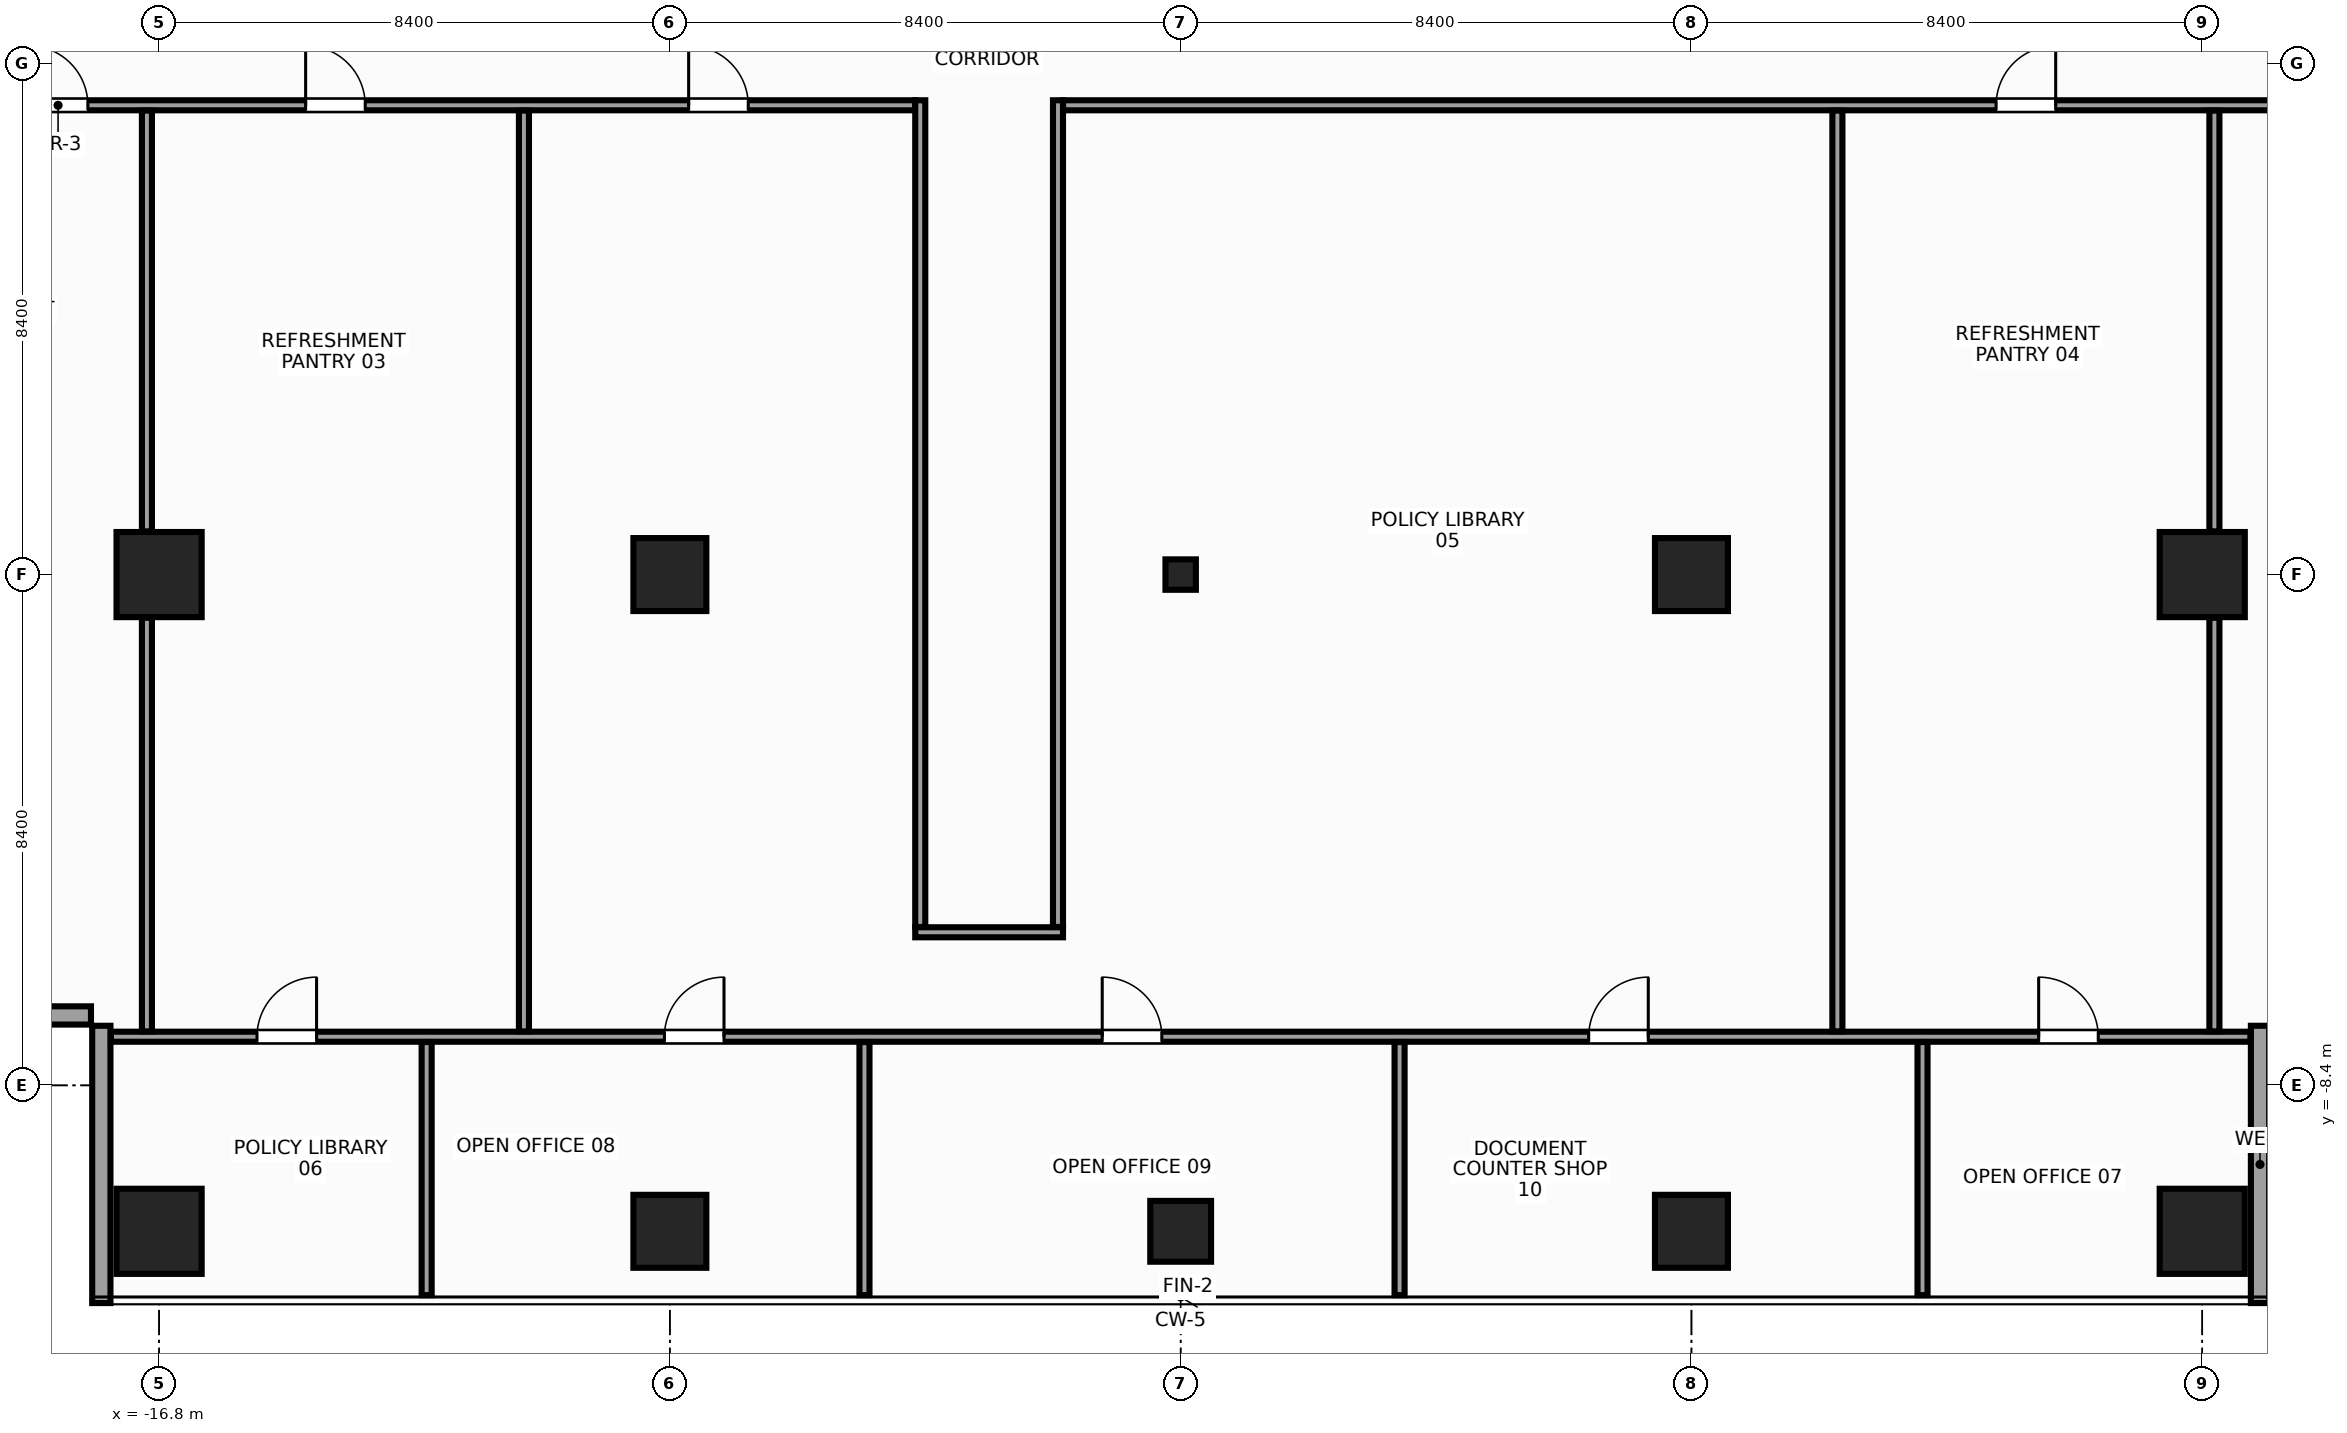
"""IFC4 building model, lengths in metres.
Left out: names, types, materials, properties, quantities, classifications, styles, units other than length and angle.
Written with IfcOpenShell. Run it as: python <this file> out.ifc"""

import sys

from ifc_helpers import new_model, si_unit, direction, frame, frame_2d, origin, origin_with_axes, origin_2d, place, context, subcontext, project, spatial, rectangle, hollow_rectangle, extrude, source, transform, mapped, element, fill, save


model = new_model("IFC4")
c1 = context("Model", 3, precision=1e-05, world=origin(), true_north=direction((0.0, 1.0)))
c2 = subcontext(c1, "Body", "Model", "MODEL_VIEW")
j1 = project(units=[si_unit("LENGTHUNIT", "METRE"), si_unit("PLANEANGLEUNIT", "RADIAN")], contexts=[c1])
p1 = place(None, origin())
s1 = spatial("IfcSite", under=j1, at=p1, CompositionType="ELEMENT")
p2 = place(p1, origin())
s2 = spatial("IfcBuilding", under=s1, at=p2, CompositionType="ELEMENT")
p3 = place(p2, frame((0.0, 0.0, 254.0)))
s3 = spatial("IfcBuildingStorey", under=s2, at=p3, CompositionType="ELEMENT", Elevation=254.0)
m1 = source(origin(), c2, "Body", "SweptSolid", [
    extrude(rectangle(XDim=1.4, YDim=1.4, at=origin_2d()), origin(), (0.0, 0.0, 1.0), 3.6),
])
for number, where, z_axis, x_axis in (
    (1, (-16.8, -10.8, 0.0), (0.0, 0.0, 1.0), (1.0, 0.0, 0.0)),
    (2, (-16.8, 0.0, 0.0), (0.0, 0.0, 1.0), (1.0, 0.0, 0.0)),
    (3, (16.8, -10.8, 0.0), (0.0, 0.0, 1.0), (1.0, 0.0, 0.0)),
    (4, (16.8, 0.0, 0.0), (0.0, 0.0, 1.0), (1.0, 0.0, 0.0)),
):
    element("IfcColumn", number, at=place(p3, frame(where, z_axis=z_axis, x_axis=x_axis)), inside=s3, PredefinedType="COLUMN", context=c2, shape_type="MappedRepresentation", body=[
        mapped(m1, transform((0.0, 0.0, 0.0), x_axis=(1.0, 0.0, 0.0), y_axis=(0.0, 1.0, 0.0), z_axis=(0.0, 0.0, 1.0), scale=1.0)),
    ])
m2 = source(origin(), c2, "Body", "SweptSolid", [
    extrude(rectangle(XDim=1.2, YDim=1.2, at=origin_2d()), origin(), (0.0, 0.0, 1.0), 3.6),
])
for number, where, z_axis, x_axis in (
    (5, (-8.4, 0.0, 0.0), (0.0, 0.0, 1.0), (1.0, 0.0, 0.0)),
    (6, (-8.4, -10.8, 0.0), (0.0, 0.0, 1.0), (1.0, 0.0, 0.0)),
    (7, (8.4, 0.0, 0.0), (0.0, 0.0, 1.0), (1.0, 0.0, 0.0)),
    (8, (8.4, -10.8, 0.0), (0.0, 0.0, 1.0), (1.0, 0.0, 0.0)),
):
    element("IfcColumn", number, at=place(p3, frame(where, z_axis=z_axis, x_axis=x_axis)), inside=s3, PredefinedType="COLUMN", context=c2, shape_type="MappedRepresentation", body=[
        mapped(m2, transform((0.0, 0.0, 0.0), x_axis=(1.0, 0.0, 0.0), y_axis=(0.0, 1.0, 0.0), z_axis=(0.0, 0.0, 1.0), scale=1.0)),
    ])
m3 = source(origin(), c2, "Body", "SweptSolid", [
    extrude(rectangle(XDim=1.0, YDim=1.0, at=origin_2d()), origin(), (0.0, 0.0, 1.0), 3.6),
])
p4 = place(p3, frame((0.0, -10.8, 0.0), z_axis=(0.0, 0.0, 1.0), x_axis=(1.0, 0.0, 0.0)))
e9 = element("IfcColumn", 9, at=p4, inside=s3, PredefinedType="COLUMN", context=c2, shape_type="MappedRepresentation", body=[
    mapped(m3, transform((0.0, 0.0, 0.0), x_axis=(1.0, 0.0, 0.0), y_axis=(0.0, 1.0, 0.0), z_axis=(0.0, 0.0, 1.0), scale=1.0)),
])
m4 = source(origin(), c2, "Body", "SweptSolid", [
    extrude(hollow_rectangle(XDim=0.5, YDim=0.5, WallThickness=0.025, at=origin_2d()), origin(), (0.0, 0.0, 1.0), 3.6),
])
p5 = place(p3, origin_with_axes())
e10 = element("IfcColumn", 10, at=p5, inside=s3, PredefinedType="COLUMN", context=c2, shape_type="MappedRepresentation", body=[
    mapped(m4, transform((0.0, 0.0, 0.0), x_axis=(1.0, 0.0, 0.0), y_axis=(0.0, 1.0, 0.0), z_axis=(0.0, 0.0, 1.0), scale=1.0)),
])
m5 = source(origin(), c2, "Body", "SweptSolid", [
    extrude(rectangle(XDim=4.56, YDim=0.3, at=frame_2d((2.28, 0.0))), origin(), (0.0, 0.0, 1.0), 2.75),
])
for number, where, z_axis, x_axis in (
    (11, (17.75, -11.98, 0.0), (0.0, 0.0, 1.0), (0.0, 1.0, 0.0)),
    (12, (-22.48, -7.25, 0.0), (0.0, 0.0, 1.0), (1.0, 0.0, 0.0)),
    (13, (-17.75, -7.42, 0.0), (0.0, 0.0, 1.0), (0.0, -1.0, 0.0)),
):
    element("IfcWall", number, at=place(p3, frame(where, z_axis=z_axis, x_axis=x_axis)), inside=s3, PredefinedType="STANDARD", context=c2, shape_type="MappedRepresentation", body=[
        mapped(m5, transform((0.0, 0.0, 0.0), x_axis=(1.0, 0.0, 0.0), y_axis=(0.0, 1.0, 0.0), z_axis=(0.0, 0.0, 1.0), scale=1.0)),
    ])
m6 = source(origin(), c2, "Body", "SweptSolid", [
    extrude(rectangle(XDim=15.6, YDim=0.165, at=frame_2d((7.8, 0.0))), origin(), (0.0, 0.0, 1.0), 2.755),
])
p6 = place(p3, frame((-19.965, 7.718, 0.0), z_axis=(0.0, 0.0, 1.0), x_axis=(1.0, 0.0, 0.0)))
e14 = element("IfcWall", 14, at=p6, inside=s3, PredefinedType="PARTITIONING", context=c2, shape_type="MappedRepresentation", body=[
    mapped(m6, transform((0.0, 0.0, 0.0), x_axis=(1.0, 0.0, 0.0), y_axis=(0.0, 1.0, 0.0), z_axis=(0.0, 0.0, 1.0), scale=1.0)),
])
p7 = place(p6, frame((1.014, 0.0, 0.0)))
e15 = element("IfcOpeningElement", 15, at=p7, cuts=e14, PredefinedType="OPENING", context=c2, shape_type="SweptSolid", body=[
    extrude(rectangle(XDim=0.98, YDim=2.15, at=frame_2d((0.49, 1.075))), frame((0.0, 0.094, 0.0), z_axis=(0.0, -1.0, 0.0), x_axis=(1.0, 0.0, 0.0)), (0.0, 0.0, 1.0), 0.189),
])
p8 = place(p6, frame((5.575, 0.0, 0.0)))
e16 = element("IfcOpeningElement", 16, at=p8, cuts=e14, PredefinedType="OPENING", context=c2, shape_type="SweptSolid", body=[
    extrude(rectangle(XDim=0.98, YDim=2.15, at=frame_2d((0.49, 1.075))), frame((0.0, 0.094, 0.0), z_axis=(0.0, -1.0, 0.0), x_axis=(1.0, 0.0, 0.0)), (0.0, 0.0, 1.0), 0.189),
])
p9 = place(p6, frame((11.874, 0.0, 0.0)))
e17 = element("IfcOpeningElement", 17, at=p9, cuts=e14, PredefinedType="OPENING", context=c2, shape_type="SweptSolid", body=[
    extrude(rectangle(XDim=0.98, YDim=2.15, at=frame_2d((0.49, 1.075))), frame((0.0, 0.094, 0.0), z_axis=(0.0, -1.0, 0.0), x_axis=(1.0, 0.0, 0.0)), (0.0, 0.0, 1.0), 0.189),
])
m7 = source(origin(), c2, "Body", "SweptSolid", [
    extrude(rectangle(XDim=21.9, YDim=0.165, at=frame_2d((10.95, 0.0))), origin(), (0.0, 0.0, 1.0), 2.755),
])
p10 = place(p3, frame((-1.935, 7.718, 0.0), z_axis=(0.0, 0.0, 1.0), x_axis=(1.0, 0.0, 0.0)))
e18 = element("IfcWall", 18, at=p10, inside=s3, PredefinedType="PARTITIONING", context=c2, shape_type="MappedRepresentation", body=[
    mapped(m7, transform((0.0, 0.0, 0.0), x_axis=(1.0, 0.0, 0.0), y_axis=(0.0, 1.0, 0.0), z_axis=(0.0, 0.0, 1.0), scale=1.0)),
])
p11 = place(p10, frame((19.906, 0.0, 0.0)))
e19 = element("IfcOpeningElement", 19, at=p11, cuts=e18, PredefinedType="OPENING", context=c2, shape_type="SweptSolid", body=[
    extrude(rectangle(XDim=0.98, YDim=2.15, at=frame_2d((0.49, 1.075))), frame((0.0, 0.094, 0.0), z_axis=(0.0, -1.0, 0.0), x_axis=(1.0, 0.0, 0.0)), (0.0, 0.0, 1.0), 0.189),
])
p12 = place(p10, frame((15.345, 0.0, 0.0)))
e20 = element("IfcOpeningElement", 20, at=p12, cuts=e18, PredefinedType="OPENING", context=c2, shape_type="SweptSolid", body=[
    extrude(rectangle(XDim=0.98, YDim=2.15, at=frame_2d((0.49, 1.075))), frame((0.0, 0.094, 0.0), z_axis=(0.0, -1.0, 0.0), x_axis=(1.0, 0.0, 0.0)), (0.0, 0.0, 1.0), 0.189),
])
m8 = source(origin(), c2, "Body", "SweptSolid", [
    extrude(rectangle(XDim=2.43, YDim=0.165, at=frame_2d((1.215, 0.0))), origin(), (0.0, 0.0, 1.0), 3.37),
])
p13 = place(p3, frame((-4.365, -5.883, 0.0), z_axis=(0.0, 0.0, 1.0), x_axis=(1.0, 0.0, 0.0)))
e21 = element("IfcWall", 21, at=p13, inside=s3, PredefinedType="PARTITIONING", context=c2, shape_type="MappedRepresentation", body=[
    mapped(m8, transform((0.0, 0.0, 0.0), x_axis=(1.0, 0.0, 0.0), y_axis=(0.0, 1.0, 0.0), z_axis=(0.0, 0.0, 1.0), scale=1.0)),
])
m9 = source(origin(), c2, "Body", "SweptSolid", [
    extrude(rectangle(XDim=13.595, YDim=0.165, at=frame_2d((6.797, 0.0))), origin(), (0.0, 0.0, 1.0), 2.655),
])
for number, where, z_axis, x_axis in (
    (22, (-4.282, -5.795, 0.0), (0.0, 0.0, 1.0), (0.0, 1.0, 0.0)),
    (23, (-2.018, -5.795, 0.0), (0.0, 0.0, 1.0), (0.0, 1.0, 0.0)),
):
    element("IfcWall", number, at=place(p3, frame(where, z_axis=z_axis, x_axis=x_axis)), inside=s3, PredefinedType="PARTITIONING", context=c2, shape_type="MappedRepresentation", body=[
        mapped(m9, transform((0.0, 0.0, 0.0), x_axis=(1.0, 0.0, 0.0), y_axis=(0.0, 1.0, 0.0), z_axis=(0.0, 0.0, 1.0), scale=1.0)),
    ])
m10 = source(origin(), c2, "Body", "SweptSolid", [
    extrude(rectangle(XDim=35.184, YDim=0.165, at=frame_2d((17.592, 0.0))), origin(), (0.0, 0.0, 1.0), 2.755),
])
p14 = place(p3, frame((-17.592, -7.6, 0.0), z_axis=(0.0, 0.0, 1.0), x_axis=(1.0, 0.0, 0.0)))
e24 = element("IfcWall", 24, at=p14, inside=s3, PredefinedType="PARTITIONING", context=c2, shape_type="MappedRepresentation", body=[
    mapped(m10, transform((0.0, 0.0, 0.0), x_axis=(1.0, 0.0, 0.0), y_axis=(0.0, 1.0, 0.0), z_axis=(0.0, 0.0, 1.0), scale=1.0)),
])
p15 = place(p14, frame((2.402, 0.0, 0.0)))
e25 = element("IfcOpeningElement", 25, at=p15, cuts=e24, PredefinedType="OPENING", context=c2, shape_type="SweptSolid", body=[
    extrude(rectangle(XDim=0.98, YDim=2.15, at=frame_2d((0.49, 1.075))), frame((0.0, 0.094, 0.0), z_axis=(0.0, -1.0, 0.0), x_axis=(1.0, 0.0, 0.0)), (0.0, 0.0, 1.0), 0.189),
])
p16 = place(p14, frame((31.702, 0.0, 0.0)))
e26 = element("IfcOpeningElement", 26, at=p16, cuts=e24, PredefinedType="OPENING", context=c2, shape_type="SweptSolid", body=[
    extrude(rectangle(XDim=0.98, YDim=2.15, at=frame_2d((0.49, 1.075))), frame((0.0, 0.094, 0.0), z_axis=(0.0, -1.0, 0.0), x_axis=(1.0, 0.0, 0.0)), (0.0, 0.0, 1.0), 0.189),
])
p17 = place(p14, frame((9.102, 0.0, 0.0)))
e27 = element("IfcOpeningElement", 27, at=p17, cuts=e24, PredefinedType="OPENING", context=c2, shape_type="SweptSolid", body=[
    extrude(rectangle(XDim=0.98, YDim=2.15, at=frame_2d((0.49, 1.075))), frame((0.0, 0.094, 0.0), z_axis=(0.0, -1.0, 0.0), x_axis=(1.0, 0.0, 0.0)), (0.0, 0.0, 1.0), 0.189),
])
p18 = place(p14, frame((16.302, 0.0, 0.0)))
e28 = element("IfcOpeningElement", 28, at=p18, cuts=e24, PredefinedType="OPENING", context=c2, shape_type="SweptSolid", body=[
    extrude(rectangle(XDim=0.98, YDim=2.15, at=frame_2d((0.49, 1.075))), frame((0.0, 0.094, 0.0), z_axis=(0.0, -1.0, 0.0), x_axis=(1.0, 0.0, 0.0)), (0.0, 0.0, 1.0), 0.189),
])
p19 = place(p14, frame((24.302, 0.0, 0.0)))
e29 = element("IfcOpeningElement", 29, at=p19, cuts=e24, PredefinedType="OPENING", context=c2, shape_type="SweptSolid", body=[
    extrude(rectangle(XDim=0.98, YDim=2.15, at=frame_2d((0.49, 1.075))), frame((0.0, 0.094, 0.0), z_axis=(0.0, -1.0, 0.0), x_axis=(1.0, 0.0, 0.0)), (0.0, 0.0, 1.0), 0.189),
])
m11 = source(origin(), c2, "Body", "SweptSolid", [
    extrude(rectangle(XDim=6.802, YDim=0.165, at=frame_2d((3.401, 0.0))), origin(), (0.0, 0.0, 1.0), 2.755),
])
p20 = place(p3, frame((-17.0, -7.512, 0.0), z_axis=(0.0, 0.0, 1.0), x_axis=(0.0, 1.0, 0.0)))
e30 = element("IfcWall", 30, at=p20, inside=s3, PredefinedType="PARTITIONING", context=c2, shape_type="MappedRepresentation", body=[
    mapped(m11, transform((0.0, 0.0, 0.0), x_axis=(1.0, 0.0, 0.0), y_axis=(0.0, 1.0, 0.0), z_axis=(0.0, 0.0, 1.0), scale=1.0)),
])
m12 = source(origin(), c2, "Body", "SweptSolid", [
    extrude(rectangle(XDim=6.92, YDim=0.165, at=frame_2d((3.46, 0.0))), origin(), (0.0, 0.0, 1.0), 2.755),
])
p21 = place(p3, frame((-17.0, 0.71, 0.0), z_axis=(0.0, 0.0, 1.0), x_axis=(0.0, 1.0, 0.0)))
e31 = element("IfcWall", 31, at=p21, inside=s3, PredefinedType="PARTITIONING", context=c2, shape_type="MappedRepresentation", body=[
    mapped(m12, transform((0.0, 0.0, 0.0), x_axis=(1.0, 0.0, 0.0), y_axis=(0.0, 1.0, 0.0), z_axis=(0.0, 0.0, 1.0), scale=1.0)),
])
m13 = source(origin(), c2, "Body", "SweptSolid", [
    extrude(rectangle(XDim=15.142, YDim=0.165, at=frame_2d((7.571, 0.0))), origin(), (0.0, 0.0, 1.0), 2.655),
])
for number, where, z_axis, x_axis in (
    (32, (-10.8, -7.512, 0.0), (0.0, 0.0, 1.0), (0.0, 1.0, 0.0)),
    (33, (10.8, -7.512, 0.0), (0.0, 0.0, 1.0), (0.0, 1.0, 0.0)),
):
    element("IfcWall", number, at=place(p3, frame(where, z_axis=z_axis, x_axis=x_axis)), inside=s3, PredefinedType="PARTITIONING", context=c2, shape_type="MappedRepresentation", body=[
        mapped(m13, transform((0.0, 0.0, 0.0), x_axis=(1.0, 0.0, 0.0), y_axis=(0.0, 1.0, 0.0), z_axis=(0.0, 0.0, 1.0), scale=1.0)),
    ])
p22 = place(p3, frame((17.0, -7.512, 0.0), z_axis=(0.0, 0.0, 1.0), x_axis=(0.0, 1.0, 0.0)))
e34 = element("IfcWall", 34, at=p22, inside=s3, PredefinedType="PARTITIONING", context=c2, shape_type="MappedRepresentation", body=[
    mapped(m11, transform((0.0, 0.0, 0.0), x_axis=(1.0, 0.0, 0.0), y_axis=(0.0, 1.0, 0.0), z_axis=(0.0, 0.0, 1.0), scale=1.0)),
])
p23 = place(p3, frame((17.0, 0.71, 0.0), z_axis=(0.0, 0.0, 1.0), x_axis=(0.0, 1.0, 0.0)))
e35 = element("IfcWall", 35, at=p23, inside=s3, PredefinedType="PARTITIONING", context=c2, shape_type="MappedRepresentation", body=[
    mapped(m12, transform((0.0, 0.0, 0.0), x_axis=(1.0, 0.0, 0.0), y_axis=(0.0, 1.0, 0.0), z_axis=(0.0, 0.0, 1.0), scale=1.0)),
])
m14 = source(origin(), c2, "Body", "SweptSolid", [
    extrude(rectangle(XDim=4.163, YDim=0.165, at=frame_2d((2.081, 0.0))), origin(), (0.0, 0.0, 1.0), 2.905),
])
for number, where, z_axis, x_axis in (
    (36, (-12.4, -11.85, 0.0), (0.0, 0.0, 1.0), (0.0, 1.0, 0.0)),
    (37, (-5.2, -11.85, 0.0), (0.0, 0.0, 1.0), (0.0, 1.0, 0.0)),
    (38, (3.6, -11.85, 0.0), (0.0, 0.0, 1.0), (0.0, 1.0, 0.0)),
    (39, (12.2, -11.85, 0.0), (0.0, 0.0, 1.0), (0.0, 1.0, 0.0)),
):
    element("IfcWall", number, at=place(p3, frame(where, z_axis=z_axis, x_axis=x_axis)), inside=s3, PredefinedType="PARTITIONING", context=c2, shape_type="MappedRepresentation", body=[
        mapped(m14, transform((0.0, 0.0, 0.0), x_axis=(1.0, 0.0, 0.0), y_axis=(0.0, 1.0, 0.0), z_axis=(0.0, 0.0, 1.0), scale=1.0)),
    ])
m15 = source(origin(), c2, "Body", "SweptSolid", [
    extrude(rectangle(XDim=0.98, YDim=2.15, at=frame_2d((0.49, 1.075))), frame((0.0, 0.025, 0.0), z_axis=(0.0, -1.0, 0.0), x_axis=(1.0, 0.0, 0.0)), (0.0, 0.0, 1.0), 0.05),
])
p24 = place(p7, origin())
e40 = element("IfcDoor", 40, at=p24, inside=s3, OperationType="SINGLE_SWING_LEFT", PredefinedType="DOOR", context=c2, shape_type="MappedRepresentation", body=[
    mapped(m15, transform((0.0, 0.0, 0.0), x_axis=(1.0, 0.0, 0.0), y_axis=(0.0, 1.0, 0.0), z_axis=(0.0, 0.0, 1.0), scale=1.0)),
])
fill(e15, e40)
p25 = place(p8, origin())
e41 = element("IfcDoor", 41, at=p25, inside=s3, OperationType="SINGLE_SWING_LEFT", PredefinedType="DOOR", context=c2, shape_type="MappedRepresentation", body=[
    mapped(m15, transform((0.0, 0.0, 0.0), x_axis=(1.0, 0.0, 0.0), y_axis=(0.0, 1.0, 0.0), z_axis=(0.0, 0.0, 1.0), scale=1.0)),
])
fill(e16, e41)
p26 = place(p12, origin())
e42 = element("IfcDoor", 42, at=p26, inside=s3, OperationType="SINGLE_SWING_RIGHT", PredefinedType="DOOR", context=c2, shape_type="MappedRepresentation", body=[
    mapped(m15, transform((0.0, 0.0, 0.0), x_axis=(1.0, 0.0, 0.0), y_axis=(0.0, 1.0, 0.0), z_axis=(0.0, 0.0, 1.0), scale=1.0)),
])
fill(e20, e42)
p27 = place(p9, origin())
e43 = element("IfcDoor", 43, at=p27, inside=s3, OperationType="SINGLE_SWING_LEFT", PredefinedType="DOOR", context=c2, shape_type="MappedRepresentation", body=[
    mapped(m15, transform((0.0, 0.0, 0.0), x_axis=(1.0, 0.0, 0.0), y_axis=(0.0, 1.0, 0.0), z_axis=(0.0, 0.0, 1.0), scale=1.0)),
])
fill(e17, e43)
p28 = place(p15, origin())
e44 = element("IfcDoor", 44, at=p28, inside=s3, OperationType="SINGLE_SWING_RIGHT", PredefinedType="DOOR", context=c2, shape_type="MappedRepresentation", body=[
    mapped(m15, transform((0.0, 0.0, 0.0), x_axis=(1.0, 0.0, 0.0), y_axis=(0.0, 1.0, 0.0), z_axis=(0.0, 0.0, 1.0), scale=1.0)),
])
fill(e25, e44)
p29 = place(p16, origin())
e45 = element("IfcDoor", 45, at=p29, inside=s3, OperationType="SINGLE_SWING_LEFT", PredefinedType="DOOR", context=c2, shape_type="MappedRepresentation", body=[
    mapped(m15, transform((0.0, 0.0, 0.0), x_axis=(1.0, 0.0, 0.0), y_axis=(0.0, 1.0, 0.0), z_axis=(0.0, 0.0, 1.0), scale=1.0)),
])
fill(e26, e45)
p30 = place(p17, origin())
e46 = element("IfcDoor", 46, at=p30, inside=s3, OperationType="SINGLE_SWING_RIGHT", PredefinedType="DOOR", context=c2, shape_type="MappedRepresentation", body=[
    mapped(m15, transform((0.0, 0.0, 0.0), x_axis=(1.0, 0.0, 0.0), y_axis=(0.0, 1.0, 0.0), z_axis=(0.0, 0.0, 1.0), scale=1.0)),
])
fill(e27, e46)
p31 = place(p18, origin())
e47 = element("IfcDoor", 47, at=p31, inside=s3, OperationType="SINGLE_SWING_LEFT", PredefinedType="DOOR", context=c2, shape_type="MappedRepresentation", body=[
    mapped(m15, transform((0.0, 0.0, 0.0), x_axis=(1.0, 0.0, 0.0), y_axis=(0.0, 1.0, 0.0), z_axis=(0.0, 0.0, 1.0), scale=1.0)),
])
fill(e28, e47)
p32 = place(p19, origin())
e48 = element("IfcDoor", 48, at=p32, inside=s3, OperationType="SINGLE_SWING_RIGHT", PredefinedType="DOOR", context=c2, shape_type="MappedRepresentation", body=[
    mapped(m15, transform((0.0, 0.0, 0.0), x_axis=(1.0, 0.0, 0.0), y_axis=(0.0, 1.0, 0.0), z_axis=(0.0, 0.0, 1.0), scale=1.0)),
])
fill(e29, e48)
save(model, sys.argv[1])
